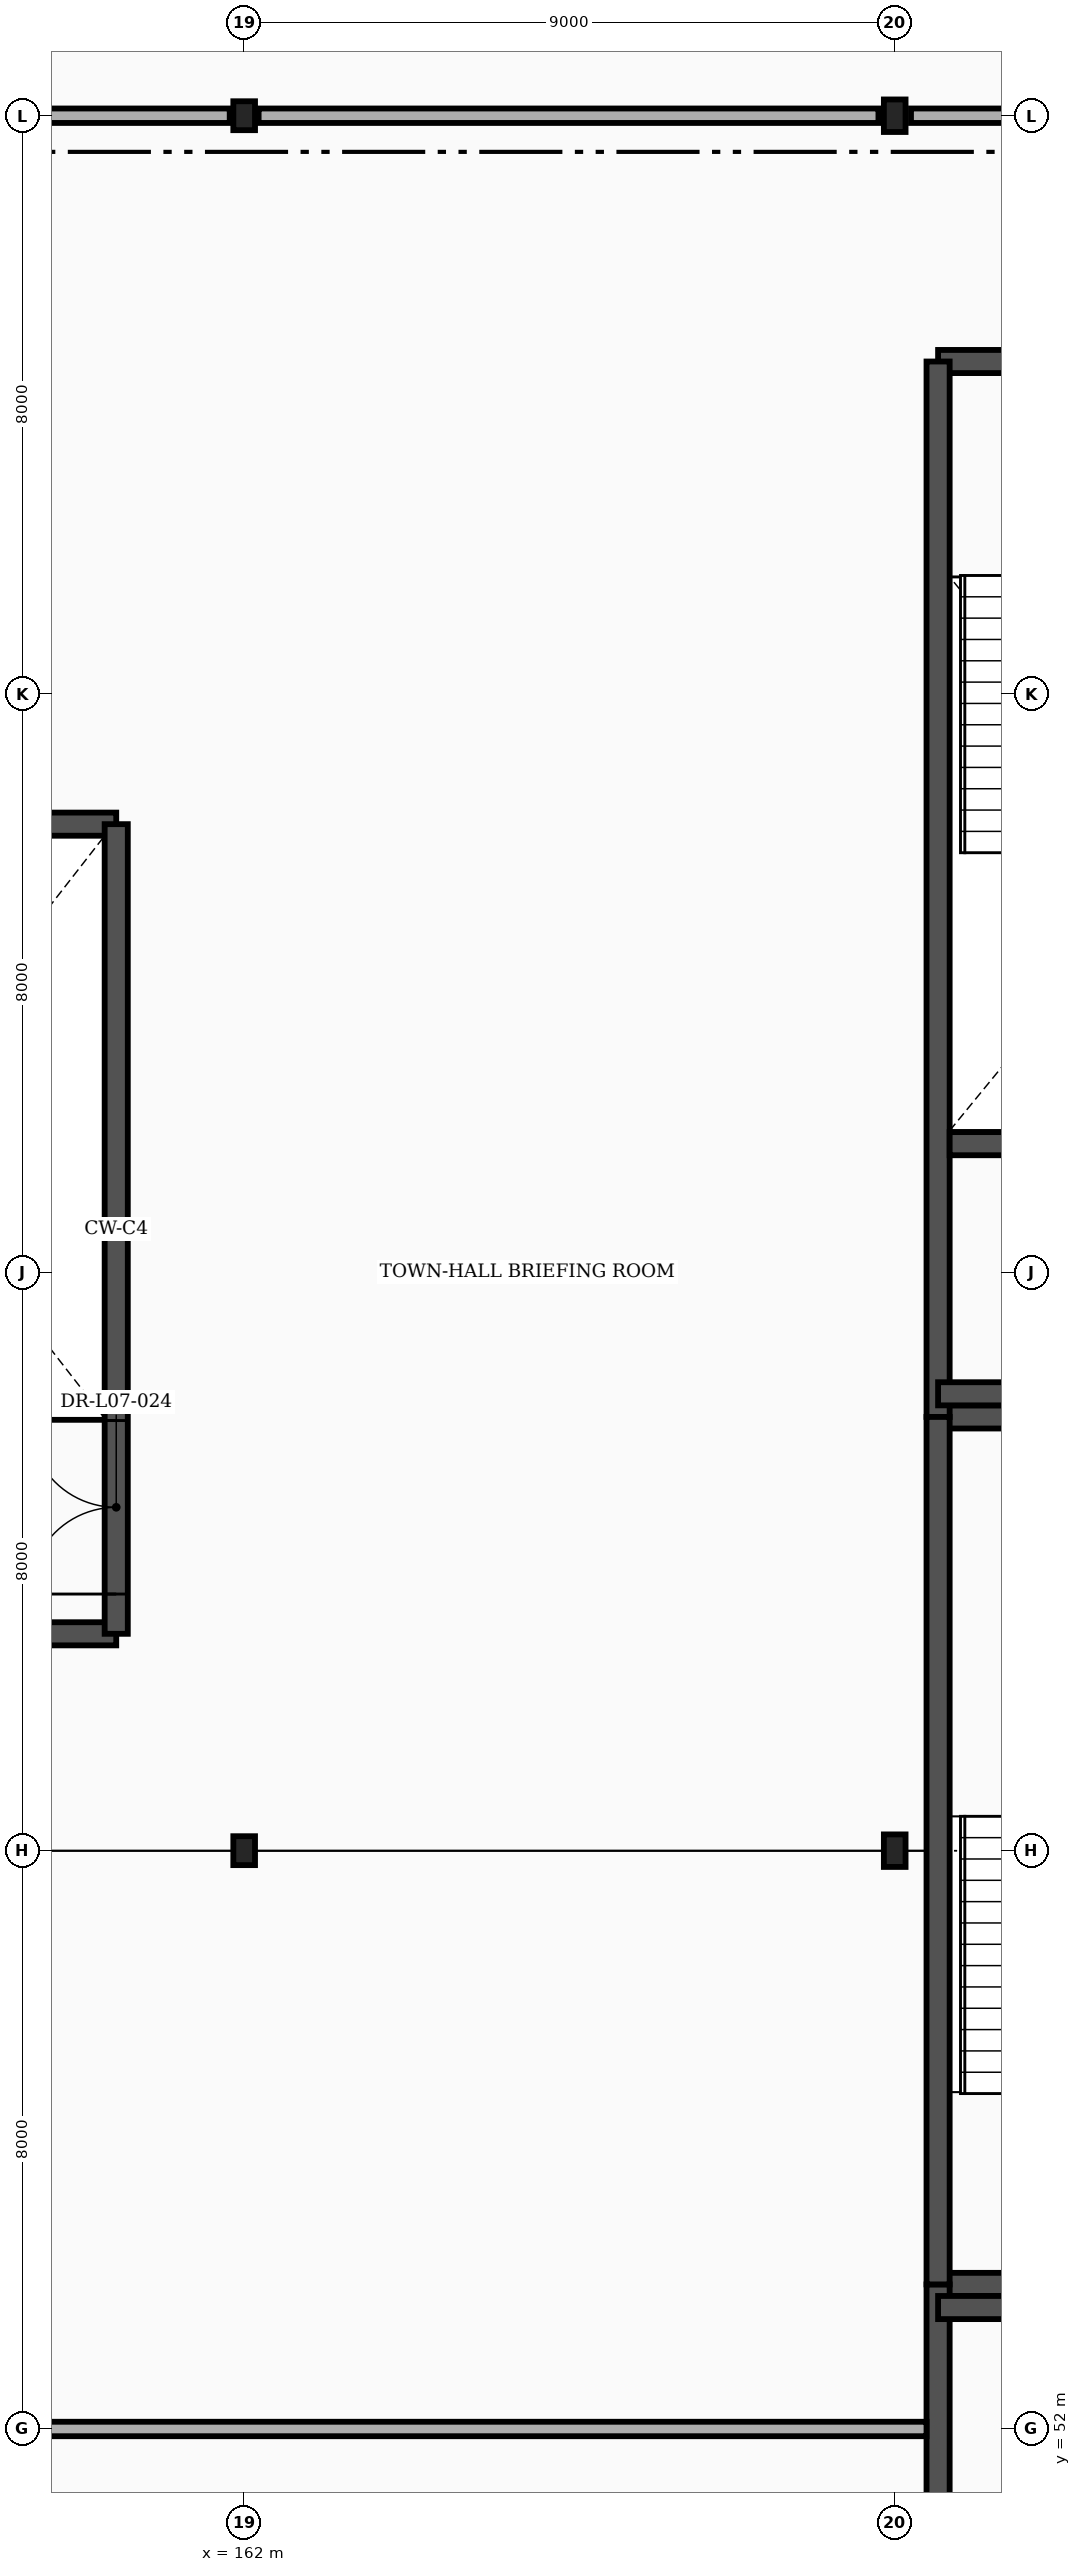
"""IFC4 building model, lengths in metres.
Left out: names, types, materials, properties, quantities, classifications, styles, units other than length and angle.
Written with IfcOpenShell. Run it as: python <this file> out.ifc"""

import sys

from ifc_helpers import new_model, si_unit, direction, frame, frame_2d, origin, origin_2d, place, context, subcontext, project, spatial, rectangle, i_section, extrude, element, fill, save


model = new_model("IFC4")
c1 = context("Model", 3, precision=1e-05, world=origin(), true_north=direction((0.0, 1.0)))
c2 = subcontext(c1, "Body", "Model", "MODEL_VIEW")
j1 = project(units=[si_unit("LENGTHUNIT", "METRE"), si_unit("PLANEANGLEUNIT", "RADIAN")], contexts=[c1])
p1 = place(None, origin())
s1 = spatial("IfcSite", under=j1, at=p1, CompositionType="ELEMENT")
p2 = place(p1, origin())
s2 = spatial("IfcBuilding", under=s1, at=p2, CompositionType="ELEMENT")
p3 = place(p2, frame((0.0, 0.0, 33.3)))
s3 = spatial("IfcBuildingStorey", under=s2, at=p3, CompositionType="ELEMENT", Elevation=33.3)
p4 = place(p3, frame((162.0, 84.0, 0.0), z_axis=(0.0, 0.0, 1.0), x_axis=(1.0, 0.0, 0.0)))
e1 = element("IfcColumn", 1, at=p4, inside=s3, PredefinedType="COLUMN", context=c2, shape_type="SweptSolid", body=[
    extrude(i_section(OverallWidth=0.3, OverallDepth=0.4, WebThickness=0.013, FlangeThickness=0.024, FilletRadius=0.027, at=origin_2d()), origin(), (0.0, 0.0, 1.0), 4.5),
])
for number, where, z_axis, x_axis in (
    (2, (171.0, 60.0, 0.0), (0.0, 0.0, 1.0), (1.0, 0.0, 0.0)),
    (3, (171.0, 84.0, 0.0), (0.0, 0.0, 1.0), (1.0, 0.0, 0.0)),
):
    element("IfcColumn", number, at=place(p3, frame(where, z_axis=z_axis, x_axis=x_axis)), inside=s3, PredefinedType="COLUMN", context=c2, shape_type="SweptSolid", body=[
        extrude(i_section(OverallWidth=0.3, OverallDepth=0.45, WebThickness=0.014, FlangeThickness=0.026, FilletRadius=0.027, at=origin_2d()), origin(), (0.0, 0.0, 1.0), 4.5),
    ])
p5 = place(p3, frame((162.0, 60.0, 0.0), z_axis=(0.0, 0.0, 1.0), x_axis=(1.0, 0.0, 0.0)))
e4 = element("IfcColumn", 4, at=p5, inside=s3, PredefinedType="COLUMN", context=c2, shape_type="SweptSolid", body=[
    extrude(i_section(OverallWidth=0.3, OverallDepth=0.4, WebThickness=0.013, FlangeThickness=0.024, FilletRadius=0.027, at=origin_2d()), origin(), (0.0, 0.0, 1.0), 4.5),
])
p6 = place(p3, frame((171.6, 54.0, 0.0), z_axis=(0.0, 0.0, 1.0), x_axis=(1.0, 0.0, 0.0)))
e5 = element("IfcWall", 5, at=p6, inside=s3, PredefinedType="SHEAR", context=c2, shape_type="SweptSolid", body=[
    extrude(rectangle(XDim=6.6, YDim=0.32, at=frame_2d((3.3, 0.0))), origin(), (0.0, 0.0, 1.0), 4.255),
])
p7 = place(p3, frame((171.6, 39.4, 0.0), z_axis=(0.0, 0.0, 1.0), x_axis=(0.0, 1.0, 0.0)))
e6 = element("IfcWall", 6, at=p7, inside=s3, PredefinedType="SHEAR", context=c2, shape_type="SweptSolid", body=[
    extrude(rectangle(XDim=14.6, YDim=0.32, at=frame_2d((7.3, 0.0))), origin(), (0.0, 0.0, 1.0), 4.255),
])
for number, where, z_axis, x_axis in (
    (7, (171.6, 66.0, 0.0), (0.0, 0.0, 1.0), (1.0, 0.0, 0.0)),
    (8, (171.6, 80.6, 0.0), (0.0, 0.0, 1.0), (1.0, 0.0, 0.0)),
):
    element("IfcWall", number, at=place(p3, frame(where, z_axis=z_axis, x_axis=x_axis)), inside=s3, PredefinedType="SHEAR", context=c2, shape_type="SweptSolid", body=[
        extrude(rectangle(XDim=6.6, YDim=0.32, at=frame_2d((3.3, 0.0))), origin(), (0.0, 0.0, 1.0), 4.255),
    ])
p8 = place(p3, frame((171.6, 66.0, 0.0), z_axis=(0.0, 0.0, 1.0), x_axis=(0.0, 1.0, 0.0)))
e9 = element("IfcWall", 9, at=p8, inside=s3, PredefinedType="SHEAR", context=c2, shape_type="SweptSolid", body=[
    extrude(rectangle(XDim=14.6, YDim=0.32, at=frame_2d((7.3, 0.0))), origin(), (0.0, 0.0, 1.0), 4.255),
])
p9 = place(p3, frame((171.76, 69.78, 0.0), z_axis=(0.0, 0.0, 1.0), x_axis=(1.0, 0.0, 0.0)))
e10 = element("IfcWall", 10, at=p9, inside=s3, PredefinedType="SHEAR", context=c2, shape_type="SweptSolid", body=[
    extrude(rectangle(XDim=6.28, YDim=0.32, at=frame_2d((3.14, 0.0))), origin(), (0.0, 0.0, 1.0), 4.255),
])
for number, where, z_axis, x_axis in (
    (11, (153.63, 63.0, 0.0), (0.0, 0.0, 1.0), (1.0, 0.0, 0.0)),
    (12, (153.63, 74.2, 0.0), (0.0, 0.0, 1.0), (1.0, 0.0, 0.0)),
):
    element("IfcWall", number, at=place(p3, frame(where, z_axis=z_axis, x_axis=x_axis)), inside=s3, PredefinedType="SHEAR", context=c2, shape_type="SweptSolid", body=[
        extrude(rectangle(XDim=6.6, YDim=0.32, at=frame_2d((3.3, 0.0))), origin(), (0.0, 0.0, 1.0), 4.255),
    ])
p10 = place(p3, frame((160.23, 63.0, 0.0), z_axis=(0.0, 0.0, 1.0), x_axis=(0.0, 1.0, 0.0)))
e13 = element("IfcWall", 13, at=p10, inside=s3, PredefinedType="SHEAR", context=c2, shape_type="SweptSolid", body=[
    extrude(rectangle(XDim=11.2, YDim=0.32, at=frame_2d((5.6, 0.0))), origin(), (0.0, 0.0, 1.0), 4.255),
])
p11 = place(p10, frame((0.55, 0.0, 0.0)))
e14 = element("IfcOpeningElement", 14, at=p11, cuts=e13, PredefinedType="OPENING", context=c2, shape_type="SweptSolid", body=[
    extrude(rectangle(XDim=2.4, YDim=2.25, at=frame_2d((1.2, 1.125))), frame((0.0, 0.172, 0.0), z_axis=(0.0, -1.0, 0.0), x_axis=(1.0, 0.0, 0.0)), (0.0, 0.0, 1.0), 0.344),
])
for number, where, z_axis, x_axis in (
    (15, (171.6, 53.68, 0.0), (0.0, 0.0, 1.0), (1.0, 0.0, 0.0)),
    (16, (171.6, 66.32, 0.0), (0.0, 0.0, 1.0), (1.0, 0.0, 0.0)),
):
    element("IfcWall", number, at=place(p3, frame(where, z_axis=z_axis, x_axis=x_axis)), inside=s3, PredefinedType="SHEAR", context=c2, shape_type="SweptSolid", body=[
        extrude(rectangle(XDim=6.6, YDim=0.32, at=frame_2d((3.3, 0.0))), origin(), (0.0, 0.0, 1.0), 4.255),
    ])
p12 = place(p3, frame((171.6, 54.0, 0.0), z_axis=(0.0, 0.0, 1.0), x_axis=(0.0, 1.0, 0.0)))
e17 = element("IfcWall", 17, at=p12, inside=s3, PredefinedType="SHEAR", context=c2, shape_type="SweptSolid", body=[
    extrude(rectangle(XDim=12.0, YDim=0.32, at=frame_2d((6.0, 0.0))), origin(), (0.0, 0.0, 1.0), 4.255),
])
p13 = place(p3, frame((153.17, 52.0, 0.0), z_axis=(0.0, 0.0, 1.0), x_axis=(1.0, 0.0, 0.0)))
e18 = element("IfcWall", 18, at=p13, inside=s3, PredefinedType="PARTITIONING", context=c2, shape_type="SweptSolid", body=[
    extrude(rectangle(XDim=18.27, YDim=0.2, at=frame_2d((9.135, 0.0))), origin(), (0.0, 0.0, 1.0), 3.868),
])
p14 = place(p13, frame((0.91, 0.0, 0.0)))
e19 = element("IfcOpeningElement", 19, at=p14, cuts=e18, PredefinedType="OPENING", context=c2, shape_type="SweptSolid", body=[
    extrude(rectangle(XDim=1.9, YDim=2.35, at=frame_2d((0.95, 1.175))), frame((0.0, 0.112, 0.0), z_axis=(0.0, -1.0, 0.0), x_axis=(1.0, 0.0, 0.0)), (0.0, 0.0, 1.0), 0.224),
])
p15 = place(p3, frame((153.17, 84.0, 0.0), z_axis=(0.0, 0.0, 1.0), x_axis=(1.0, 0.0, 0.0)))
e20 = element("IfcWall", 20, at=p15, inside=s3, PredefinedType="PARTITIONING", context=c2, shape_type="SweptSolid", body=[
    extrude(rectangle(XDim=8.63, YDim=0.2, at=frame_2d((4.315, 0.0))), origin(), (0.0, 0.0, 1.0), 3.715),
])
p16 = place(p3, frame((162.2, 84.0, 0.0), z_axis=(0.0, 0.0, 1.0), x_axis=(1.0, 0.0, 0.0)))
e21 = element("IfcWall", 21, at=p16, inside=s3, PredefinedType="PARTITIONING", context=c2, shape_type="SweptSolid", body=[
    extrude(rectangle(XDim=8.575, YDim=0.2, at=frame_2d((4.288, 0.0))), origin(), (0.0, 0.0, 1.0), 3.638),
])
p17 = place(p3, frame((171.225, 84.0, 0.0), z_axis=(0.0, 0.0, 1.0), x_axis=(1.0, 0.0, 0.0)))
e22 = element("IfcWall", 22, at=p17, inside=s3, PredefinedType="PARTITIONING", context=c2, shape_type="SweptSolid", body=[
    extrude(rectangle(XDim=6.875, YDim=0.2, at=frame_2d((3.438, 0.0))), origin(), (0.0, 0.0, 1.0), 3.493),
])
p18 = place(p11, origin())
e23 = element("IfcDoor", 23, at=p18, inside=s3, OperationType="DOUBLE_DOOR_SINGLE_SWING", PredefinedType="DOOR", context=c2, shape_type="SweptSolid", body=[
    extrude(rectangle(XDim=2.4, YDim=2.25, at=frame_2d((1.2, 1.125))), frame((0.0, 0.025, 0.0), z_axis=(0.0, -1.0, 0.0), x_axis=(1.0, 0.0, 0.0)), (0.0, 0.0, 1.0), 0.05),
])
fill(e14, e23)
save(model, sys.argv[1])
